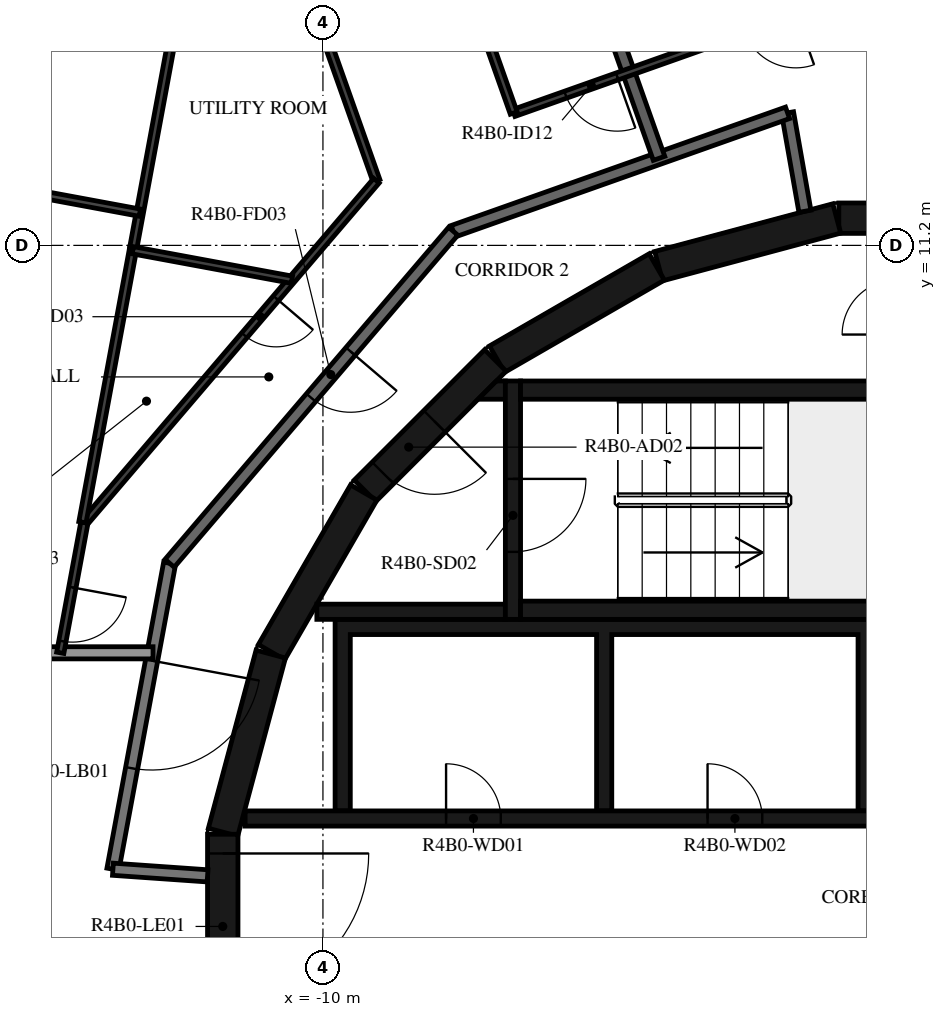
"""IFC4 building model, lengths in metres.
Left out: names, types, materials, properties, quantities, classifications, styles, units other than length and angle.
Written with IfcOpenShell. Run it as: python <this file> out.ifc"""

import sys

from ifc_helpers import new_model, si_unit, direction, frame, frame_2d, origin, place, context, subcontext, project, spatial, polyline, rectangle, outline, extrude, element, fill, save


model = new_model("IFC4")
c1 = context("Model", 3, precision=1e-05, world=origin(), true_north=direction((0.0, 1.0)))
c2 = subcontext(c1, "Body", "Model", "MODEL_VIEW")
j1 = project(units=[si_unit("LENGTHUNIT", "METRE"), si_unit("PLANEANGLEUNIT", "RADIAN")], contexts=[c1])
p1 = place(None, origin())
s1 = spatial("IfcSite", under=j1, at=p1, CompositionType="ELEMENT")
p2 = place(p1, origin())
s2 = spatial("IfcBuilding", under=s1, at=p2, CompositionType="ELEMENT")
p3 = place(p2, frame((0.0, 0.0, 165.7)))
s3 = spatial("IfcBuildingStorey", under=s2, at=p3, CompositionType="ELEMENT", Elevation=165.7)
for number, where, z_axis, x_axis in (
    (1, (1.516, 11.647, 0.0), (0.0, 0.0, 1.0), (-1.0, 0.0, 0.0)),
    (2, (-1.55, 11.643, 0.0), (0.0, 0.0, 1.0), (-0.966, -0.259, 0.0)),
    (3, (-4.51, 10.845, 0.0), (0.0, 0.0, 1.0), (-0.866, -0.5, 0.0)),
):
    element("IfcWall", number, at=place(p3, frame(where, z_axis=z_axis, x_axis=x_axis)), inside=s3, PredefinedType="SHEAR", context=c2, shape_type="SweptSolid", body=[
        extrude(rectangle(XDim=3.033, YDim=0.5, at=frame_2d((1.516, 0.0))), origin(), (0.0, 0.0, 1.0), 3.12),
    ])
p4 = place(p3, frame((-7.164, 9.308, 0.0), z_axis=(0.0, 0.0, 1.0), x_axis=(-0.707106781187, -0.707106781187, 0.0)))
e4 = element("IfcWall", 4, at=p4, inside=s3, PredefinedType="SHEAR", context=c2, shape_type="SweptSolid", body=[
    extrude(rectangle(XDim=3.032, YDim=0.5, at=frame_2d((1.516, 0.0))), origin(), (0.0, 0.0, 1.0), 3.12),
])
p5 = place(p4, frame((1.416, 0.0, 0.0)))
e5 = element("IfcOpeningElement", 5, at=p5, cuts=e4, PredefinedType="OPENING", context=c2, shape_type="SweptSolid", body=[
    extrude(rectangle(XDim=1.2, YDim=2.1, at=frame_2d((0.6, 1.05))), frame((0.0, 0.26, 0.0), z_axis=(0.0, -1.0, 0.0), x_axis=(1.0, 0.0, 0.0)), (0.0, 0.0, 1.0), 0.52),
])
for number, where, z_axis, x_axis in (
    (6, (-9.329, 7.137, 0.0), (0.0, 0.0, 1.0), (-0.5, -0.866, 0.0)),
    (7, (-10.858, 4.479, 0.0), (0.0, 0.0, 1.0), (-0.259, -0.966, 0.0)),
):
    element("IfcWall", number, at=place(p3, frame(where, z_axis=z_axis, x_axis=x_axis)), inside=s3, PredefinedType="SHEAR", context=c2, shape_type="SweptSolid", body=[
        extrude(rectangle(XDim=3.033, YDim=0.5, at=frame_2d((1.516, 0.0))), origin(), (0.0, 0.0, 1.0), 3.12),
    ])
p6 = place(p3, frame((-11.647, 1.516, 0.0), z_axis=(0.0, 0.0, 1.0), x_axis=(0.0, -1.0, 0.0)))
e8 = element("IfcWall", 8, at=p6, inside=s3, PredefinedType="SHEAR", context=c2, shape_type="SweptSolid", body=[
    extrude(rectangle(XDim=3.033, YDim=0.5, at=frame_2d((1.516, 0.0))), origin(), (0.0, 0.0, 1.0), 3.12),
])
p7 = place(p6, frame((0.316, 0.0, 0.0)))
e9 = element("IfcOpeningElement", 9, at=p7, cuts=e8, PredefinedType="OPENING", context=c2, shape_type="SweptSolid", body=[
    extrude(rectangle(XDim=2.4, YDim=2.1, at=frame_2d((1.2, 1.05))), frame((0.0, 0.26, 0.0), z_axis=(0.0, -1.0, 0.0), x_axis=(1.0, 0.0, 0.0)), (0.0, 0.0, 1.0), 0.52),
])
for number, where, z_axis, x_axis in (
    (10, (-6.75, 5.2, 0.0), (0.0, 0.0, 1.0), (1.0, 0.0, 0.0)),
    (11, (-6.75, 8.82, 0.0), (0.0, 0.0, 1.0), (1.0, 0.0, 0.0)),
):
    element("IfcWall", number, at=place(p3, frame(where, z_axis=z_axis, x_axis=x_axis)), inside=s3, PredefinedType="SHEAR", context=c2, shape_type="SweptSolid", body=[
        extrude(rectangle(XDim=6.75, YDim=0.3, at=frame_2d((3.375, 0.0))), origin(), (0.0, 0.0, 1.0), 3.12),
    ])
p8 = place(p3, frame((-6.875, 8.97, 0.0), z_axis=(0.0, 0.0, 1.0), x_axis=(0.0, -1.0, 0.0)))
e12 = element("IfcWall", 12, at=p8, inside=s3, PredefinedType="SHEAR", context=c2, shape_type="SweptSolid", body=[
    extrude(rectangle(XDim=3.92, YDim=0.25, at=frame_2d((1.96, 0.0))), origin(), (0.0, 0.0, 1.0), 3.12),
])
p9 = place(p8, frame((1.61, 0.0, 0.0)))
e13 = element("IfcOpeningElement", 13, at=p9, cuts=e12, PredefinedType="OPENING", context=c2, shape_type="SweptSolid", body=[
    extrude(rectangle(XDim=1.2, YDim=2.1, at=frame_2d((0.6, 1.05))), frame((0.0, 0.135, 0.0), z_axis=(0.0, -1.0, 0.0), x_axis=(1.0, 0.0, 0.0)), (0.0, 0.0, 1.0), 0.27),
])
p10 = place(p3, frame((-7.0, 5.175, 0.0), z_axis=(0.0, 0.0, 1.0), x_axis=(-1.0, 0.0, 0.0)))
e14 = element("IfcWall", 14, at=p10, inside=s3, PredefinedType="SHEAR", context=c2, shape_type="SweptSolid", body=[
    extrude(rectangle(XDim=3.1, YDim=0.25, at=frame_2d((1.55, 0.0))), origin(), (0.0, 0.0, 1.0), 3.12),
])
p11 = place(p3, origin())
e15 = element("IfcWall", 15, at=p11, inside=s3, PredefinedType="SHEAR", context=c2, shape_type="SweptSolid", body=[
    extrude(outline(polyline([(-7.148, 8.97), (-7.0, 8.97), (-7.0, 8.67), (-7.448, 8.67), (-7.148, 8.97)])), origin(), (0.0, 0.0, 1.0), 3.12),
])
p12 = place(p3, origin())
e16 = element("IfcWall", 16, at=p12, inside=s3, PredefinedType="SHEAR", context=c2, shape_type="SweptSolid", body=[
    extrude(outline(polyline([(-9.55, 4.8), (-5.5, 4.8), (-5.5, 1.9), (-5.25, 1.9), (-5.25, 4.8), (-1.2, 4.8), (-1.2, 1.9), (-0.95, 1.9), (-0.95, 4.8), (0.95, 4.8), (0.95, 1.9), (1.2, 1.9), (1.2, 4.8), (3.1, 4.8), (3.1, 1.9), (3.35, 1.9), (3.35, 4.8), (5.25, 4.8), (5.25, 1.9), (5.5, 1.9), (5.5, 4.8), (7.4, 4.8), (7.4, 1.9), (7.65, 1.9), (7.65, 4.8), (9.55, 4.8), (9.55, 1.9), (9.8, 1.9), (9.8, 4.8), (9.8, 5.05), (-9.8, 5.05), (-9.8, 4.8), (-9.8, 1.9), (-9.55, 1.9), (-9.55, 4.8)])), origin(), (0.0, 0.0, 1.0), 3.12),
])
p13 = place(p3, frame((-11.28, 1.775, 0.0), z_axis=(0.0, 0.0, 1.0), x_axis=(1.0, 0.0, 0.0)))
e17 = element("IfcWall", 17, at=p13, inside=s3, PredefinedType="SHEAR", context=c2, shape_type="SweptSolid", body=[
    extrude(rectangle(XDim=14.38, YDim=0.25, at=frame_2d((7.19, 0.0))), origin(), (0.0, 0.0, 1.0), 3.12),
])
p14 = place(p13, frame((10.73, 0.0, 0.0)))
e18 = element("IfcOpeningElement", 18, at=p14, cuts=e17, PredefinedType="OPENING", context=c2, shape_type="SweptSolid", body=[
    extrude(rectangle(XDim=1.1, YDim=2.1, at=frame_2d((0.55, 1.05))), frame((0.0, 0.135, 0.0), z_axis=(0.0, -1.0, 0.0), x_axis=(1.0, 0.0, 0.0)), (0.0, 0.0, 1.0), 0.27),
])
p15 = place(p13, frame((12.88, 0.0, 0.0)))
e19 = element("IfcOpeningElement", 19, at=p15, cuts=e17, PredefinedType="OPENING", context=c2, shape_type="SweptSolid", body=[
    extrude(rectangle(XDim=1.1, YDim=2.1, at=frame_2d((0.55, 1.05))), frame((0.0, 0.135, 0.0), z_axis=(0.0, -1.0, 0.0), x_axis=(1.0, 0.0, 0.0)), (0.0, 0.0, 1.0), 0.27),
])
p16 = place(p13, frame((3.305, 0.0, 0.0)))
e20 = element("IfcOpeningElement", 20, at=p16, cuts=e17, PredefinedType="OPENING", context=c2, shape_type="SweptSolid", body=[
    extrude(rectangle(XDim=0.9, YDim=2.1, at=frame_2d((0.45, 1.05))), frame((0.0, 0.135, 0.0), z_axis=(0.0, -1.0, 0.0), x_axis=(1.0, 0.0, 0.0)), (0.0, 0.0, 1.0), 0.27),
])
p17 = place(p13, frame((7.605, 0.0, 0.0)))
e21 = element("IfcOpeningElement", 21, at=p17, cuts=e17, PredefinedType="OPENING", context=c2, shape_type="SweptSolid", body=[
    extrude(rectangle(XDim=0.9, YDim=2.1, at=frame_2d((0.45, 1.05))), frame((0.0, 0.135, 0.0), z_axis=(0.0, -1.0, 0.0), x_axis=(1.0, 0.0, 0.0)), (0.0, 0.0, 1.0), 0.27),
])
p18 = place(p3, frame((-12.521, 5.972, 0.0), z_axis=(0.0, 0.0, 1.0), x_axis=(-0.182251559718, -0.983251935661, 0.0)))
e22 = element("IfcWall", 22, at=p18, inside=s3, PredefinedType="STANDARD", context=c2, shape_type="SweptSolid", body=[
    extrude(rectangle(XDim=5.117, YDim=0.2, at=frame_2d((2.559, 0.0))), origin(), (0.0, 0.0, 1.0), 3.12),
])
p19 = place(p18, frame((1.627, 0.0, 0.0)))
e23 = element("IfcOpeningElement", 23, at=p19, cuts=e22, PredefinedType="OPENING", context=c2, shape_type="SweptSolid", body=[
    extrude(rectangle(XDim=1.8, YDim=2.1, at=frame_2d((0.9, 1.05))), frame((0.0, 0.11, 0.0), z_axis=(0.0, -1.0, 0.0), x_axis=(1.0, 0.0, 0.0)), (0.0, 0.0, 1.0), 0.22),
])
p20 = place(p3, frame((-13.454, 0.941, 0.0), z_axis=(0.0, 0.0, 1.0), x_axis=(0.99755155062, -0.069934997354, 0.0)))
e24 = element("IfcWall", 24, at=p20, inside=s3, PredefinedType="STANDARD", context=c2, shape_type="SweptSolid", body=[
    extrude(rectangle(XDim=1.561, YDim=0.2, at=frame_2d((0.78, 0.0))), origin(), (0.0, 0.0, 1.0), 3.12),
])
p21 = place(p3, frame((-2.074, 11.761, 0.0), z_axis=(0.0, 0.0, 1.0), x_axis=(-0.1736412798, 0.984808969267, 0.0)))
e25 = element("IfcWall", 25, at=p21, inside=s3, PredefinedType="STANDARD", context=c2, shape_type="SweptSolid", body=[
    extrude(rectangle(XDim=1.644, YDim=0.2, at=frame_2d((0.822, 0.0))), origin(), (0.0, 0.0, 1.0), 3.12),
])
p22 = place(p3, frame((-2.359, 13.38, 0.0), z_axis=(0.0, 0.0, 1.0), x_axis=(-0.942647529236, -0.333789807551, 0.0)))
e26 = element("IfcWall", 26, at=p22, inside=s3, PredefinedType="STANDARD", context=c2, shape_type="SweptSolid", body=[
    extrude(rectangle(XDim=5.833, YDim=0.2, at=frame_2d((2.917, 0.0))), origin(), (0.0, 0.0, 1.0), 3.12),
])
p23 = place(p3, frame((-7.858, 11.433, 0.0), z_axis=(0.0, 0.0, 1.0), x_axis=(-0.649440801937, -0.760412154545, 0.0)))
e27 = element("IfcWall", 27, at=p23, inside=s3, PredefinedType="STANDARD", context=c2, shape_type="SweptSolid", body=[
    extrude(rectangle(XDim=7.181, YDim=0.2, at=frame_2d((3.59, 0.0))), origin(), (0.0, 0.0, 1.0), 3.12),
])
p24 = place(p23, frame((2.6, 0.0, 0.0)))
e28 = element("IfcOpeningElement", 28, at=p24, cuts=e27, PredefinedType="OPENING", context=c2, shape_type="SweptSolid", body=[
    extrude(rectangle(XDim=1.0, YDim=2.1, at=frame_2d((0.5, 1.05))), frame((0.0, 0.11, 0.0), z_axis=(0.0, -1.0, 0.0), x_axis=(1.0, 0.0, 0.0)), (0.0, 0.0, 1.0), 0.22),
])
p25 = place(p3, frame((-12.794, 4.5, 0.0), z_axis=(0.0, 0.0, 1.0), x_axis=(-1.0, 0.0, 0.0)))
e29 = element("IfcWall", 29, at=p25, inside=s3, PredefinedType="STANDARD", context=c2, shape_type="SweptSolid", body=[
    extrude(rectangle(XDim=5.106, YDim=0.2, at=frame_2d((2.553, 0.0))), origin(), (0.0, 0.0, 1.0), 2.73),
])
p26 = place(p3, frame((-5.887, 16.626, 0.0), z_axis=(0.0, 0.0, 1.0), x_axis=(0.333820478853, -0.942636668021, 0.0)))
e30 = element("IfcWall", 30, at=p26, inside=s3, PredefinedType="STANDARD", context=c2, shape_type="SweptSolid", body=[
    extrude(rectangle(XDim=4.238, YDim=0.2, at=frame_2d((2.119, 0.0))), origin(), (0.0, 0.0, 1.0), 3.12),
])
p27 = place(p3, frame((6.081, 14.027, 0.0), z_axis=(0.0, 0.0, 1.0), x_axis=(-0.983250989832, 0.182256662416, 0.0)))
e31 = element("IfcWall", 31, at=p27, inside=s3, PredefinedType="PARTITIONING", context=c2, shape_type="SweptSolid", body=[
    extrude(rectangle(XDim=7.416, YDim=0.12, at=frame_2d((3.708, 0.0))), origin(), (0.0, 0.0, 1.0), 3.12),
])
p28 = place(p27, frame((0.2, 0.0, 0.0)))
e32 = element("IfcOpeningElement", 32, at=p28, cuts=e31, PredefinedType="OPENING", context=c2, shape_type="SweptSolid", body=[
    extrude(rectangle(XDim=0.9, YDim=2.1, at=frame_2d((0.45, 1.05))), frame((0.0, 0.07, 0.0), z_axis=(0.0, -1.0, 0.0), x_axis=(1.0, 0.0, 0.0)), (0.0, 0.0, 1.0), 0.14),
])
p29 = place(p27, frame((4.065, 0.0, 0.0)))
e33 = element("IfcOpeningElement", 33, at=p29, cuts=e31, PredefinedType="OPENING", context=c2, shape_type="SweptSolid", body=[
    extrude(rectangle(XDim=0.8, YDim=2.1, at=frame_2d((0.4, 1.05))), frame((0.0, 0.07, 0.0), z_axis=(0.0, -1.0, 0.0), x_axis=(1.0, 0.0, 0.0)), (0.0, 0.0, 1.0), 0.14),
])
p30 = place(p3, frame((-1.21, 15.378, 0.0), z_axis=(0.0, 0.0, 1.0), x_axis=(-0.9426440416, -0.333799656734, 0.0)))
e34 = element("IfcWall", 34, at=p30, inside=s3, PredefinedType="PARTITIONING", context=c2, shape_type="SweptSolid", body=[
    extrude(rectangle(XDim=5.996, YDim=0.12, at=frame_2d((2.998, 0.0))), origin(), (0.0, 0.0, 1.0), 3.12),
])
p31 = place(p30, frame((1.075, 0.0, 0.0)))
e35 = element("IfcOpeningElement", 35, at=p31, cuts=e34, PredefinedType="OPENING", context=c2, shape_type="SweptSolid", body=[
    extrude(rectangle(XDim=0.9, YDim=2.1, at=frame_2d((0.45, 1.05))), frame((0.0, 0.07, 0.0), z_axis=(0.0, -1.0, 0.0), x_axis=(1.0, 0.0, 0.0)), (0.0, 0.0, 1.0), 0.14),
])
p32 = place(p30, frame((4.192, 0.0, 0.0)))
e36 = element("IfcOpeningElement", 36, at=p32, cuts=e34, PredefinedType="OPENING", context=c2, shape_type="SweptSolid", body=[
    extrude(rectangle(XDim=0.9, YDim=2.1, at=frame_2d((0.45, 1.05))), frame((0.0, 0.07, 0.0), z_axis=(0.0, -1.0, 0.0), x_axis=(1.0, 0.0, 0.0)), (0.0, 0.0, 1.0), 0.14),
])
p33 = place(p3, frame((-6.862, 13.377, 0.0), z_axis=(0.0, 0.0, 1.0), x_axis=(-0.333868827671, 0.942619544625, 0.0)))
e37 = element("IfcWall", 37, at=p33, inside=s3, PredefinedType="PARTITIONING", context=c2, shape_type="SweptSolid", body=[
    extrude(rectangle(XDim=3.543, YDim=0.12, at=frame_2d((1.771, 0.0))), origin(), (0.0, 0.0, 1.0), 3.12),
])
p34 = place(p3, frame((-10.402, 15.882, 0.0), z_axis=(0.0, 0.0, 1.0), x_axis=(0.33382476952, -0.942635148536, 0.0)))
e38 = element("IfcWall", 38, at=p34, inside=s3, PredefinedType="PARTITIONING", context=c2, shape_type="SweptSolid", body=[
    extrude(rectangle(XDim=3.838, YDim=0.12, at=frame_2d((1.919, 0.0))), origin(), (0.0, 0.0, 1.0), 3.12),
])
p35 = place(p3, frame((-9.12, 12.264, 0.0), z_axis=(0.0, 0.0, 1.0), x_axis=(-0.649444490942, -0.760409003882, 0.0)))
e39 = element("IfcWall", 39, at=p35, inside=s3, PredefinedType="PARTITIONING", context=c2, shape_type="SweptSolid", body=[
    extrude(rectangle(XDim=7.395, YDim=0.12, at=frame_2d((3.697, 0.0))), origin(), (0.0, 0.0, 1.0), 3.12),
])
p36 = place(p35, frame((2.542, 0.0, 0.0)))
e40 = element("IfcOpeningElement", 40, at=p36, cuts=e39, PredefinedType="OPENING", context=c2, shape_type="SweptSolid", body=[
    extrude(rectangle(XDim=0.8, YDim=2.1, at=frame_2d((0.4, 1.05))), frame((0.0, 0.07, 0.0), z_axis=(0.0, -1.0, 0.0), x_axis=(1.0, 0.0, 0.0)), (0.0, 0.0, 1.0), 0.14),
])
p37 = place(p3, frame((-13.923, 6.641, 0.0), z_axis=(0.0, 0.0, 1.0), x_axis=(-0.182209715759, -0.983259690765, 0.0)))
e41 = element("IfcWall", 41, at=p37, inside=s3, PredefinedType="PARTITIONING", context=c2, shape_type="SweptSolid", body=[
    extrude(rectangle(XDim=2.177, YDim=0.12, at=frame_2d((1.089, 0.0))), origin(), (0.0, 0.0, 1.0), 3.12),
])
p38 = place(p37, frame((1.083, 0.0, 0.0)))
e42 = element("IfcOpeningElement", 42, at=p38, cuts=e41, PredefinedType="OPENING", context=c2, shape_type="SweptSolid", body=[
    extrude(rectangle(XDim=0.9, YDim=2.1, at=frame_2d((0.45, 1.05))), frame((0.0, 0.07, 0.0), z_axis=(0.0, -1.0, 0.0), x_axis=(1.0, 0.0, 0.0)), (0.0, 0.0, 1.0), 0.14),
])
p39 = place(p3, frame((-13.955, 6.647, 0.0), z_axis=(0.0, 0.0, 1.0), x_axis=(0.182264522222, 0.983249532896, 0.0)))
e43 = element("IfcWall", 43, at=p39, inside=s3, PredefinedType="PARTITIONING", context=c2, shape_type="SweptSolid", body=[
    extrude(rectangle(XDim=4.589, YDim=0.12, at=frame_2d((2.294, 0.0))), origin(), (0.0, 0.0, 1.0), 3.12),
])
p40 = place(p3, frame((-11.396, 20.453, 0.0), z_axis=(0.0, 0.0, 1.0), x_axis=(-0.182223370439, -0.983257160292, 0.0)))
e44 = element("IfcWall", 44, at=p40, inside=s3, PredefinedType="PARTITIONING", context=c2, shape_type="SweptSolid", body=[
    extrude(rectangle(XDim=9.452, YDim=0.12, at=frame_2d((4.726, 0.0))), origin(), (0.0, 0.0, 1.0), 3.12),
])
p41 = place(p40, frame((3.406, 0.0, 0.0)))
e45 = element("IfcOpeningElement", 45, at=p41, cuts=e44, PredefinedType="OPENING", context=c2, shape_type="SweptSolid", body=[
    extrude(rectangle(XDim=0.9, YDim=2.1, at=frame_2d((0.45, 1.05))), frame((0.0, 0.07, 0.0), z_axis=(0.0, -1.0, 0.0), x_axis=(1.0, 0.0, 0.0)), (0.0, 0.0, 1.0), 0.14),
])
p42 = place(p40, frame((0.2, 0.0, 0.0)))
e46 = element("IfcOpeningElement", 46, at=p42, cuts=e44, PredefinedType="OPENING", context=c2, shape_type="SweptSolid", body=[
    extrude(rectangle(XDim=0.9, YDim=2.1, at=frame_2d((0.45, 1.05))), frame((0.0, 0.07, 0.0), z_axis=(0.0, -1.0, 0.0), x_axis=(1.0, 0.0, 0.0)), (0.0, 0.0, 1.0), 0.14),
])
p43 = place(p3, frame((-13.126, 11.12, 0.0), z_axis=(0.0, 0.0, 1.0), x_axis=(0.983257646361, -0.182220747645, 0.0)))
e47 = element("IfcWall", 47, at=p43, inside=s3, PredefinedType="PARTITIONING", context=c2, shape_type="SweptSolid", body=[
    extrude(rectangle(XDim=2.659, YDim=0.12, at=frame_2d((1.33, 0.0))), origin(), (0.0, 0.0, 1.0), 3.12),
])
p44 = place(p3, frame((-16.552, 12.394, 0.0), z_axis=(0.0, 0.0, 1.0), x_axis=(0.983257712156, -0.182220392618, 0.0)))
e48 = element("IfcWall", 48, at=p44, inside=s3, PredefinedType="PARTITIONING", context=c2, shape_type="SweptSolid", body=[
    extrude(rectangle(XDim=3.6, YDim=0.12, at=frame_2d((1.8, 0.0))), origin(), (0.0, 0.0, 1.0), 2.73),
])
p45 = place(p9, origin())
e49 = element("IfcDoor", 49, at=p45, inside=s3, OperationType="SINGLE_SWING_LEFT", PredefinedType="DOOR", context=c2, shape_type="SweptSolid", body=[
    extrude(rectangle(XDim=1.2, YDim=2.1, at=frame_2d((0.6, 1.05))), frame((0.0, 0.025, 0.0), z_axis=(0.0, -1.0, 0.0), x_axis=(1.0, 0.0, 0.0)), (0.0, 0.0, 1.0), 0.05),
])
fill(e13, e49)
p46 = place(p5, origin())
e50 = element("IfcDoor", 50, at=p46, inside=s3, OperationType="SINGLE_SWING_RIGHT", PredefinedType="DOOR", context=c2, shape_type="SweptSolid", body=[
    extrude(rectangle(XDim=1.2, YDim=2.1, at=frame_2d((0.6, 1.05))), frame((0.0, 0.025, 0.0), z_axis=(0.0, -1.0, 0.0), x_axis=(1.0, 0.0, 0.0)), (0.0, 0.0, 1.0), 0.05),
])
fill(e5, e50)
p47 = place(p7, origin())
e51 = element("IfcDoor", 51, at=p47, inside=s3, OperationType="DOUBLE_DOOR_SINGLE_SWING", PredefinedType="DOOR", context=c2, shape_type="SweptSolid", body=[
    extrude(rectangle(XDim=2.4, YDim=2.1, at=frame_2d((1.2, 1.05))), frame((0.0, 0.025, 0.0), z_axis=(0.0, -1.0, 0.0), x_axis=(1.0, 0.0, 0.0)), (0.0, 0.0, 1.0), 0.05),
])
fill(e9, e51)
p48 = place(p16, origin())
e52 = element("IfcDoor", 52, at=p48, inside=s3, OperationType="SINGLE_SWING_LEFT", PredefinedType="DOOR", context=c2, shape_type="SweptSolid", body=[
    extrude(rectangle(XDim=0.9, YDim=2.1, at=frame_2d((0.45, 1.05))), frame((0.0, 0.025, 0.0), z_axis=(0.0, -1.0, 0.0), x_axis=(1.0, 0.0, 0.0)), (0.0, 0.0, 1.0), 0.05),
])
fill(e20, e52)
p49 = place(p17, origin())
e53 = element("IfcDoor", 53, at=p49, inside=s3, OperationType="SINGLE_SWING_RIGHT", PredefinedType="DOOR", context=c2, shape_type="SweptSolid", body=[
    extrude(rectangle(XDim=0.9, YDim=2.1, at=frame_2d((0.45, 1.05))), frame((0.0, 0.025, 0.0), z_axis=(0.0, -1.0, 0.0), x_axis=(1.0, 0.0, 0.0)), (0.0, 0.0, 1.0), 0.05),
])
fill(e21, e53)
p50 = place(p24, origin())
e54 = element("IfcDoor", 54, at=p50, inside=s3, OperationType="SINGLE_SWING_LEFT", PredefinedType="DOOR", context=c2, shape_type="SweptSolid", body=[
    extrude(rectangle(XDim=1.0, YDim=2.1, at=frame_2d((0.5, 1.05))), frame((0.0, 0.025, 0.0), z_axis=(0.0, -1.0, 0.0), x_axis=(1.0, 0.0, 0.0)), (0.0, 0.0, 1.0), 0.05),
])
fill(e28, e54)
p51 = place(p32, origin())
e55 = element("IfcDoor", 55, at=p51, inside=s3, OperationType="SINGLE_SWING_LEFT", PredefinedType="DOOR", context=c2, shape_type="SweptSolid", body=[
    extrude(rectangle(XDim=0.9, YDim=2.1, at=frame_2d((0.45, 1.05))), frame((0.0, 0.025, 0.0), z_axis=(0.0, -1.0, 0.0), x_axis=(1.0, 0.0, 0.0)), (0.0, 0.0, 1.0), 0.05),
])
fill(e36, e55)
p52 = place(p36, origin())
e56 = element("IfcDoor", 56, at=p52, inside=s3, OperationType="SINGLE_SWING_LEFT", PredefinedType="DOOR", context=c2, shape_type="SweptSolid", body=[
    extrude(rectangle(XDim=0.8, YDim=2.1, at=frame_2d((0.4, 1.05))), frame((0.0, 0.025, 0.0), z_axis=(0.0, -1.0, 0.0), x_axis=(1.0, 0.0, 0.0)), (0.0, 0.0, 1.0), 0.05),
])
fill(e40, e56)
p53 = place(p38, origin())
e57 = element("IfcDoor", 57, at=p53, inside=s3, OperationType="SINGLE_SWING_LEFT", PredefinedType="DOOR", context=c2, shape_type="SweptSolid", body=[
    extrude(rectangle(XDim=0.9, YDim=2.1, at=frame_2d((0.45, 1.05))), frame((0.0, 0.025, 0.0), z_axis=(0.0, -1.0, 0.0), x_axis=(1.0, 0.0, 0.0)), (0.0, 0.0, 1.0), 0.05),
])
fill(e42, e57)
p54 = place(p19, origin())
e58 = element("IfcDoor", 58, at=p54, inside=s3, OperationType="DOUBLE_DOOR_SINGLE_SWING", PredefinedType="DOOR", context=c2, shape_type="SweptSolid", body=[
    extrude(rectangle(XDim=1.8, YDim=2.1, at=frame_2d((0.9, 1.05))), frame((0.0, 0.025, 0.0), z_axis=(0.0, -1.0, 0.0), x_axis=(1.0, 0.0, 0.0)), (0.0, 0.0, 1.0), 0.05),
])
fill(e23, e58)
save(model, sys.argv[1])
